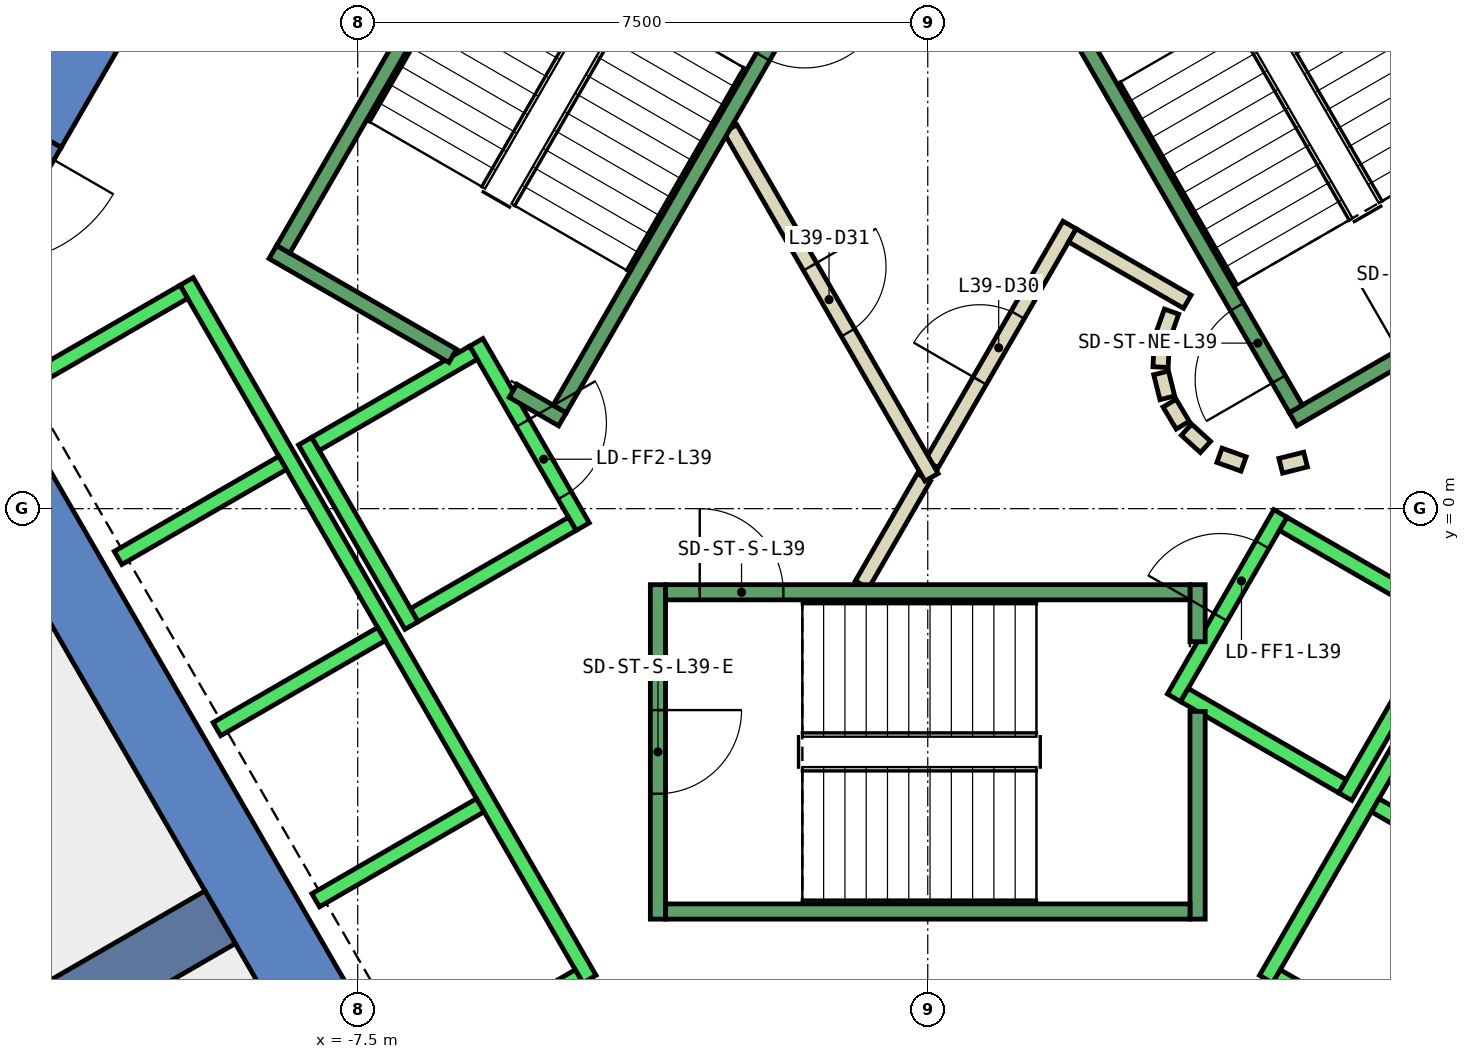
"""IFC4 building model, lengths in metres.
Left out: names, types, materials, properties, quantities, classifications, styles, units other than length and angle.
Written with IfcOpenShell. Run it as: python <this file> out.ifc"""

import sys

from ifc_helpers import new_model, si_unit, direction, frame, frame_2d, origin, place, context, subcontext, project, spatial, polyline, rectangle, outline, extrude, element, fill, save


model = new_model("IFC4")
c1 = context("Model", 3, precision=1e-05, world=origin(), true_north=direction((0.0, 1.0)))
c2 = subcontext(c1, "Body", "Model", "MODEL_VIEW")
j1 = project(units=[si_unit("LENGTHUNIT", "METRE"), si_unit("PLANEANGLEUNIT", "RADIAN")], contexts=[c1])
p1 = place(None, origin())
s1 = spatial("IfcSite", under=j1, at=p1, CompositionType="ELEMENT")
p2 = place(p1, origin())
s2 = spatial("IfcBuilding", under=s1, at=p2, CompositionType="ELEMENT")
p3 = place(p2, frame((0.0, 0.0, 176.0)))
s3 = spatial("IfcBuildingStorey", under=s2, at=p3, CompositionType="ELEMENT", Elevation=176.0)
p4 = place(p3, frame((0.0, 0.0, -0.4)))
e1 = element("IfcWall", 1, at=p4, inside=s3, PredefinedType="SHEAR", context=c2, shape_type="SweptSolid", body=[
    extrude(outline(polyline([(-12.267, 5.252), (-11.402, 4.752), (-6.351, 13.5), (-6.928, 14.5), (-12.267, 5.252)])), origin(), (0.0, 0.0, 1.0), 4.2),
])
p5 = place(p3, frame((0.0, 0.0, 3.6)))
e2 = element("IfcWall", 2, at=p5, inside=s3, PredefinedType="SHEAR", context=c2, shape_type="SweptSolid", body=[
    extrude(outline(polyline([(-13.267, 3.52), (-12.402, 3.02), (-11.402, 4.752), (-12.267, 5.252), (-13.267, 3.52)])), origin(), (0.0, 0.0, 1.0), 0.2),
])
p6 = place(p3, frame((0.0, 0.0, -0.4)))
e3 = element("IfcWall", 3, at=p6, inside=s3, PredefinedType="SHEAR", context=c2, shape_type="SweptSolid", body=[
    extrude(outline(polyline([(-13.856, 2.5), (-6.928, -9.5), (-6.351, -8.5), (-12.702, 2.5), (-13.856, 2.5)])), origin(), (0.0, 0.0, 1.0), 4.2),
])
p7 = place(p3, frame((-9.31, -5.375, -0.4), z_axis=(0.0, 0.0, 1.0), x_axis=(-0.866017533419, -0.500013631625, 0.0)))
e4 = element("IfcWall", 4, at=p7, inside=s3, PredefinedType="SHEAR", context=c2, shape_type="SweptSolid", body=[
    extrude(rectangle(XDim=9.0, YDim=0.8, at=frame_2d((4.5, 0.0))), origin(), (0.0, 0.0, 1.0), 4.2),
])
p8 = place(p3, frame((-0.866, -1.0, 0.0), z_axis=(0.0, 0.0, 1.0), x_axis=(0.500033287521, 0.866006184372, 0.0)))
e5 = element("IfcWall", 5, at=p8, inside=s3, PredefinedType="PARTITIONING", context=c2, shape_type="SweptSolid", body=[
    extrude(rectangle(XDim=1.632, YDim=0.2, at=frame_2d((0.816, 0.0))), origin(), (0.0, 0.0, 1.0), 3.75),
])
p9 = place(p3, frame((0.05, 0.587, 0.0), z_axis=(0.0, 0.0, 1.0), x_axis=(0.500028932171, 0.866008699143, 0.0)))
e6 = element("IfcWall", 6, at=p9, inside=s3, PredefinedType="PARTITIONING", context=c2, shape_type="SweptSolid", body=[
    extrude(rectangle(XDim=3.632, YDim=0.2, at=frame_2d((1.816, 0.0))), origin(), (0.0, 0.0, 1.0), 3.75),
])
p10 = place(p9, frame((1.266, 0.0, 0.0)))
e7 = element("IfcOpeningElement", 7, at=p10, cuts=e6, PredefinedType="OPENING", context=c2, shape_type="SweptSolid", body=[
    extrude(rectangle(XDim=1.0, YDim=2.1, at=frame_2d((0.5, 1.05))), frame((0.0, 0.11, 0.0), z_axis=(0.0, -1.0, 0.0), x_axis=(1.0, 0.0, 0.0)), (0.0, 0.0, 1.0), 0.22),
])
p11 = place(p3, frame((1.903, 3.595, 0.0), z_axis=(0.0, 0.0, 1.0), x_axis=(0.866239139897, -0.499629615326, 0.0)))
e8 = element("IfcWall", 8, at=p11, inside=s3, PredefinedType="PARTITIONING", context=c2, shape_type="SweptSolid", body=[
    extrude(rectangle(XDim=1.745, YDim=0.2, at=frame_2d((0.873, 0.0))), origin(), (0.0, 0.0, 1.0), 3.75),
])
p12 = place(p3, frame((3.208, 2.592, 0.0), z_axis=(0.0, 0.0, 1.0), x_axis=(-0.337388820924, -0.941365382578, 0.0)))
e9 = element("IfcWall", 9, at=p12, inside=s3, PredefinedType="PARTITIONING", context=c2, shape_type="SweptSolid", body=[
    extrude(rectangle(XDim=0.338, YDim=0.2, at=frame_2d((0.169, 0.0))), origin(), (0.0, 0.0, 1.0), 3.75),
])
p13 = place(p3, frame((3.079, 2.199, 0.0), z_axis=(0.0, 0.0, 1.0), x_axis=(-0.047771483479, -0.998858290933, 0.0)))
e10 = element("IfcWall", 10, at=p13, inside=s3, PredefinedType="PARTITIONING", context=c2, shape_type="SweptSolid", body=[
    extrude(rectangle(XDim=0.337, YDim=0.2, at=frame_2d((0.169, 0.0))), origin(), (0.0, 0.0, 1.0), 3.75),
])
p14 = place(p3, frame((3.07, 1.786, 0.0), z_axis=(0.0, 0.0, 1.0), x_axis=(0.242705583207, -0.970099994784, 0.0)))
e11 = element("IfcWall", 11, at=p14, inside=s3, PredefinedType="PARTITIONING", context=c2, shape_type="SweptSolid", body=[
    extrude(rectangle(XDim=0.338, YDim=0.2, at=frame_2d((0.169, 0.0))), origin(), (0.0, 0.0, 1.0), 3.75),
])
for number, where, z_axis, x_axis in (
    (12, (3.182, 1.388, 0.0), (0.0, 0.0, 1.0), (0.512, -0.859, 0.0)),
    (13, (3.404, 1.039, 0.0), (0.0, 0.0, 1.0), (0.74, -0.672, 0.0)),
):
    element("IfcWall", number, at=place(p3, frame(where, z_axis=z_axis, x_axis=x_axis)), inside=s3, PredefinedType="PARTITIONING", context=c2, shape_type="SweptSolid", body=[
        extrude(rectangle(XDim=0.338, YDim=0.2, at=frame_2d((0.169, 0.0))), origin(), (0.0, 0.0, 1.0), 3.75),
    ])
p15 = place(p3, frame((3.838, 0.702, 0.0), z_axis=(0.0, 0.0, 1.0), x_axis=(0.941035081519, -0.338308993895, 0.0)))
e14 = element("IfcWall", 14, at=p15, inside=s3, PredefinedType="PARTITIONING", context=c2, shape_type="SweptSolid", body=[
    extrude(rectangle(XDim=0.337, YDim=0.2, at=frame_2d((0.168, 0.0))), origin(), (0.0, 0.0, 1.0), 3.75),
])
p16 = place(p3, frame((4.644, 0.564, 0.0), z_axis=(0.0, 0.0, 1.0), x_axis=(0.969929076366, 0.243387729394, 0.0)))
e15 = element("IfcWall", 15, at=p16, inside=s3, PredefinedType="PARTITIONING", context=c2, shape_type="SweptSolid", body=[
    extrude(rectangle(XDim=0.337, YDim=0.2, at=frame_2d((0.168, 0.0))), origin(), (0.0, 0.0, 1.0), 3.75),
])
p17 = place(p3, frame((-2.598, 5.0, 0.0), z_axis=(0.0, 0.0, 1.0), x_axis=(0.49995654735, -0.86605048973, 0.0)))
e16 = element("IfcWall", 16, at=p17, inside=s3, PredefinedType="PARTITIONING", context=c2, shape_type="SweptSolid", body=[
    extrude(rectangle(XDim=5.296, YDim=0.2, at=frame_2d((2.648, 0.0))), origin(), (0.0, 0.0, 1.0), 3.75),
])
p18 = place(p17, frame((2.098, 0.0, 0.0)))
e17 = element("IfcOpeningElement", 17, at=p18, cuts=e16, PredefinedType="OPENING", context=c2, shape_type="SweptSolid", body=[
    extrude(rectangle(XDim=1.0, YDim=2.1, at=frame_2d((0.5, 1.05))), frame((0.0, 0.11, 0.0), z_axis=(0.0, -1.0, 0.0), x_axis=(1.0, 0.0, 0.0)), (0.0, 0.0, 1.0), 0.22),
])
p19 = place(p3, frame((-5.94, 2.188, 0.0), z_axis=(0.0, 0.0, 1.0), x_axis=(0.49994636267, -0.866056369097, 0.0)))
e18 = element("IfcWall", 18, at=p19, inside=s3, PredefinedType="STANDARD", context=c2, shape_type="SweptSolid", body=[
    extrude(rectangle(XDim=2.8, YDim=0.2, at=frame_2d((1.4, 0.0))), origin(), (0.0, 0.0, 1.0), 3.75),
])
p20 = place(p19, frame((1.225, 0.0, 0.0)))
e19 = element("IfcOpeningElement", 19, at=p20, cuts=e18, PredefinedType="OPENING", context=c2, shape_type="SweptSolid", body=[
    extrude(rectangle(XDim=1.1, YDim=2.1, at=frame_2d((0.55, 1.05))), frame((0.0, 0.11, 0.0), z_axis=(0.0, -1.0, 0.0), x_axis=(1.0, 0.0, 0.0)), (0.0, 0.0, 1.0), 0.22),
])
p21 = place(p3, frame((-8.192, 0.888, 0.0), z_axis=(0.0, 0.0, 1.0), x_axis=(0.49994636267, -0.866056369097, 0.0)))
e20 = element("IfcWall", 20, at=p21, inside=s3, PredefinedType="STANDARD", context=c2, shape_type="SweptSolid", body=[
    extrude(rectangle(XDim=2.8, YDim=0.2, at=frame_2d((1.4, 0.0))), origin(), (0.0, 0.0, 1.0), 3.75),
])
for number, where, z_axis, x_axis in (
    (21, (-5.977, 2.052, 0.0), (0.0, 0.0, 1.0), (-0.866, -0.5, 0.0)),
    (22, (-4.677, -0.2, 0.0), (0.0, 0.0, 1.0), (-0.866, -0.5, 0.0)),
):
    element("IfcWall", number, at=place(p3, frame(where, z_axis=z_axis, x_axis=x_axis)), inside=s3, PredefinedType="STANDARD", context=c2, shape_type="SweptSolid", body=[
        extrude(rectangle(XDim=2.399, YDim=0.2, at=frame_2d((1.2, 0.0))), origin(), (0.0, 0.0, 1.0), 3.75),
    ])
p22 = place(p3, frame((-9.751, 2.99, 0.0), z_axis=(0.0, 0.0, 1.0), x_axis=(0.50000090737, -0.866024879913, 0.0)))
e23 = element("IfcWall", 23, at=p22, inside=s3, PredefinedType="STANDARD", context=c2, shape_type="SweptSolid", body=[
    extrude(rectangle(XDim=10.6, YDim=0.2, at=frame_2d((5.3, 0.0))), origin(), (0.0, 0.0, 1.0), 3.75),
])
p23 = place(p3, frame((-9.788, 2.853, 0.0), z_axis=(0.0, 0.0, 1.0), x_axis=(-0.865998541277, -0.500046524342, 0.0)))
e24 = element("IfcWall", 24, at=p23, inside=s3, PredefinedType="STANDARD", context=c2, shape_type="SweptSolid", body=[
    extrude(rectangle(XDim=2.5, YDim=0.2, at=frame_2d((1.25, 0.0))), origin(), (0.0, 0.0, 1.0), 3.75),
])
for number, where, z_axis, x_axis in (
    (25, (-8.488, 0.602, 0.0), (0.0, 0.0, 1.0), (-0.866, -0.5, 0.0)),
    (26, (-7.188, -1.65, 0.0), (0.0, 0.0, 1.0), (-0.866, -0.5, 0.0)),
    (27, (-5.888, -3.902, 0.0), (0.0, 0.0, 1.0), (-0.866, -0.5, 0.0)),
    (28, (-4.588, -6.153, 0.0), (0.0, 0.0, 1.0), (-0.866, -0.5, 0.0)),
):
    element("IfcWall", number, at=place(p3, frame(where, z_axis=z_axis, x_axis=x_axis)), inside=s3, PredefinedType="STANDARD", context=c2, shape_type="SweptSolid", body=[
        extrude(rectangle(XDim=2.5, YDim=0.2, at=frame_2d((1.25, 0.0))), origin(), (0.0, 0.0, 1.0), 3.75),
    ])
p24 = place(p3, frame((3.24, -2.488, 0.0), z_axis=(0.0, 0.0, 1.0), x_axis=(0.49994636267, 0.866056369097, 0.0)))
e29 = element("IfcWall", 29, at=p24, inside=s3, PredefinedType="STANDARD", context=c2, shape_type="SweptSolid", body=[
    extrude(rectangle(XDim=2.8, YDim=0.2, at=frame_2d((1.4, 0.0))), origin(), (0.0, 0.0, 1.0), 3.75),
])
p25 = place(p24, frame((1.225, 0.0, 0.0)))
e30 = element("IfcOpeningElement", 30, at=p25, cuts=e29, PredefinedType="OPENING", context=c2, shape_type="SweptSolid", body=[
    extrude(rectangle(XDim=1.1, YDim=2.1, at=frame_2d((0.55, 1.05))), frame((0.0, 0.11, 0.0), z_axis=(0.0, -1.0, 0.0), x_axis=(1.0, 0.0, 0.0)), (0.0, 0.0, 1.0), 0.22),
])
p26 = place(p3, frame((5.492, -3.788, 0.0), z_axis=(0.0, 0.0, 1.0), x_axis=(0.500011755427, 0.866018616679, 0.0)))
e31 = element("IfcWall", 31, at=p26, inside=s3, PredefinedType="STANDARD", context=c2, shape_type="SweptSolid", body=[
    extrude(rectangle(XDim=2.8, YDim=0.2, at=frame_2d((1.4, 0.0))), origin(), (0.0, 0.0, 1.0), 3.75),
])
p27 = place(p3, frame((3.377, -2.452, 0.0), z_axis=(0.0, 0.0, 1.0), x_axis=(0.865955154139, -0.50012165622, 0.0)))
e32 = element("IfcWall", 32, at=p27, inside=s3, PredefinedType="STANDARD", context=c2, shape_type="SweptSolid", body=[
    extrude(rectangle(XDim=2.4, YDim=0.2, at=frame_2d((1.2, 0.0))), origin(), (0.0, 0.0, 1.0), 3.75),
])
p28 = place(p3, frame((4.677, -0.2, 0.0), z_axis=(0.0, 0.0, 1.0), x_axis=(0.865973769406, -0.500089422704, 0.0)))
e33 = element("IfcWall", 33, at=p28, inside=s3, PredefinedType="STANDARD", context=c2, shape_type="SweptSolid", body=[
    extrude(rectangle(XDim=2.399, YDim=0.2, at=frame_2d((1.2, 0.0))), origin(), (0.0, 0.0, 1.0), 3.75),
])
p29 = place(p3, frame((4.451, -6.19, 0.0), z_axis=(0.0, 0.0, 1.0), x_axis=(0.50000090737, 0.866024879913, 0.0)))
e34 = element("IfcWall", 34, at=p29, inside=s3, PredefinedType="STANDARD", context=c2, shape_type="SweptSolid", body=[
    extrude(rectangle(XDim=10.6, YDim=0.2, at=frame_2d((5.3, 0.0))), origin(), (0.0, 0.0, 1.0), 3.75),
])
for number, where, z_axis, x_axis in (
    (35, (4.588, -6.153, 0.0), (0.0, 0.0, 1.0), (0.866, -0.5, 0.0)),
    (36, (5.888, -3.902, 0.0), (0.0, 0.0, 1.0), (0.866, -0.5, 0.0)),
):
    element("IfcWall", number, at=place(p3, frame(where, z_axis=z_axis, x_axis=x_axis)), inside=s3, PredefinedType="STANDARD", context=c2, shape_type="SweptSolid", body=[
        extrude(rectangle(XDim=2.5, YDim=0.2, at=frame_2d((1.25, 0.0))), origin(), (0.0, 0.0, 1.0), 3.75),
    ])
p30 = place(p3, frame((-3.55, -1.0, 0.0), z_axis=(0.0, 0.0, 1.0), x_axis=(0.0, -1.0, 0.0)))
e37 = element("IfcWall", 37, at=p30, inside=s3, PredefinedType="STANDARD", context=c2, shape_type="SweptSolid", body=[
    extrude(rectangle(XDim=4.4, YDim=0.2, at=frame_2d((2.2, 0.0))), origin(), (0.0, 0.0, 1.0), 3.75),
])
p31 = place(p30, frame((1.65, 0.0, 0.0)))
e38 = element("IfcOpeningElement", 38, at=p31, cuts=e37, PredefinedType="OPENING", context=c2, shape_type="SweptSolid", body=[
    extrude(rectangle(XDim=1.1, YDim=2.2, at=frame_2d((0.55, 1.1))), frame((0.0, 0.11, 0.0), z_axis=(0.0, -1.0, 0.0), x_axis=(1.0, 0.0, 0.0)), (0.0, 0.0, 1.0), 0.22),
])
p32 = place(p3, frame((3.55, -2.667, 0.0), z_axis=(0.0, 0.0, 1.0), x_axis=(0.0, -1.0, 0.0)))
e39 = element("IfcWall", 39, at=p32, inside=s3, PredefinedType="STANDARD", context=c2, shape_type="SweptSolid", body=[
    extrude(rectangle(XDim=2.733, YDim=0.2, at=frame_2d((1.366, 0.0))), origin(), (0.0, 0.0, 1.0), 3.75),
])
p33 = place(p3, frame((3.55, -1.0, 0.0), z_axis=(0.0, 0.0, 1.0), x_axis=(0.0, -1.0, 0.0)))
e40 = element("IfcWall", 40, at=p33, inside=s3, PredefinedType="STANDARD", context=c2, shape_type="SweptSolid", body=[
    extrude(rectangle(XDim=0.751, YDim=0.2, at=frame_2d((0.375, 0.0))), origin(), (0.0, 0.0, 1.0), 3.75),
])
p34 = place(p3, frame((-3.45, -1.1, 0.0), z_axis=(0.0, 0.0, 1.0), x_axis=(1.0, 0.0, 0.0)))
e41 = element("IfcWall", 41, at=p34, inside=s3, PredefinedType="STANDARD", context=c2, shape_type="SweptSolid", body=[
    extrude(rectangle(XDim=6.9, YDim=0.2, at=frame_2d((3.45, 0.0))), origin(), (0.0, 0.0, 1.0), 3.75),
])
p35 = place(p34, frame((0.45, 0.0, 0.0)))
e42 = element("IfcOpeningElement", 42, at=p35, cuts=e41, PredefinedType="OPENING", context=c2, shape_type="SweptSolid", body=[
    extrude(rectangle(XDim=1.1, YDim=2.2, at=frame_2d((0.55, 1.1))), frame((0.0, 0.11, 0.0), z_axis=(0.0, -1.0, 0.0), x_axis=(1.0, 0.0, 0.0)), (0.0, 0.0, 1.0), 0.22),
])
p36 = place(p3, frame((-3.45, -5.3, 0.0), z_axis=(0.0, 0.0, 1.0), x_axis=(1.0, 0.0, 0.0)))
e43 = element("IfcWall", 43, at=p36, inside=s3, PredefinedType="STANDARD", context=c2, shape_type="SweptSolid", body=[
    extrude(rectangle(XDim=6.9, YDim=0.2, at=frame_2d((3.45, 0.0))), origin(), (0.0, 0.0, 1.0), 3.75),
])
p37 = place(p3, frame((4.806, 1.176, 0.0), z_axis=(0.0, 0.0, 1.0), x_axis=(0.866059941101, 0.499940174841, 0.0)))
e44 = element("IfcWall", 44, at=p37, inside=s3, PredefinedType="STANDARD", context=c2, shape_type="SweptSolid", body=[
    extrude(rectangle(XDim=4.4, YDim=0.2, at=frame_2d((2.2, 0.0))), origin(), (0.0, 0.0, 1.0), 3.75),
])
p38 = place(p37, frame((1.65, 0.0, 0.0)))
e45 = element("IfcOpeningElement", 45, at=p38, cuts=e44, PredefinedType="OPENING", context=c2, shape_type="SweptSolid", body=[
    extrude(rectangle(XDim=1.1, YDim=2.2, at=frame_2d((0.55, 1.1))), frame((0.0, 0.11, 0.0), z_axis=(0.0, -1.0, 0.0), x_axis=(1.0, 0.0, 0.0)), (0.0, 0.0, 1.0), 0.22),
])
p39 = place(p3, frame((4.843, 1.312, 0.0), z_axis=(0.0, 0.0, 1.0), x_axis=(-0.499963383562, 0.866046543262, 0.0)))
e46 = element("IfcWall", 46, at=p39, inside=s3, PredefinedType="STANDARD", context=c2, shape_type="SweptSolid", body=[
    extrude(rectangle(XDim=6.9, YDim=0.2, at=frame_2d((3.45, 0.0))), origin(), (0.0, 0.0, 1.0), 3.75),
])
p40 = place(p39, frame((0.45, 0.0, 0.0)))
e47 = element("IfcOpeningElement", 47, at=p40, cuts=e46, PredefinedType="OPENING", context=c2, shape_type="SweptSolid", body=[
    extrude(rectangle(XDim=1.1, YDim=2.2, at=frame_2d((0.55, 1.1))), frame((0.0, 0.11, 0.0), z_axis=(0.0, -1.0, 0.0), x_axis=(1.0, 0.0, 0.0)), (0.0, 0.0, 1.0), 0.22),
])
p41 = place(p3, frame((8.48, 3.412, 0.0), z_axis=(0.0, 0.0, 1.0), x_axis=(-0.499978703459, 0.866037698999, 0.0)))
e48 = element("IfcWall", 48, at=p41, inside=s3, PredefinedType="STANDARD", context=c2, shape_type="SweptSolid", body=[
    extrude(rectangle(XDim=6.9, YDim=0.2, at=frame_2d((3.45, 0.0))), origin(), (0.0, 0.0, 1.0), 3.75),
])
p42 = place(p3, frame((-6.25, 2.01, 0.0), z_axis=(0.0, 0.0, 1.0), x_axis=(-0.86611865017, 0.499838457731, 0.0)))
e49 = element("IfcWall", 49, at=p42, inside=s3, PredefinedType="STANDARD", context=c2, shape_type="SweptSolid", body=[
    extrude(rectangle(XDim=2.733, YDim=0.2, at=frame_2d((1.366, 0.0))), origin(), (0.0, 0.0, 1.0), 3.75),
])
p43 = place(p3, frame((-4.806, 1.176, 0.0), z_axis=(0.0, 0.0, 1.0), x_axis=(-0.866558586415, 0.499075361355, 0.0)))
e50 = element("IfcWall", 50, at=p43, inside=s3, PredefinedType="STANDARD", context=c2, shape_type="SweptSolid", body=[
    extrude(rectangle(XDim=0.751, YDim=0.2, at=frame_2d((0.376, 0.0))), origin(), (0.0, 0.0, 1.0), 3.75),
])
p44 = place(p3, frame((-1.393, 7.288, 0.0), z_axis=(0.0, 0.0, 1.0), x_axis=(-0.499963383562, -0.866046543262, 0.0)))
e51 = element("IfcWall", 51, at=p44, inside=s3, PredefinedType="STANDARD", context=c2, shape_type="SweptSolid", body=[
    extrude(rectangle(XDim=6.9, YDim=0.2, at=frame_2d((3.45, 0.0))), origin(), (0.0, 0.0, 1.0), 3.75),
])
p45 = place(p44, frame((0.45, 0.0, 0.0)))
e52 = element("IfcOpeningElement", 52, at=p45, cuts=e51, PredefinedType="OPENING", context=c2, shape_type="SweptSolid", body=[
    extrude(rectangle(XDim=1.1, YDim=2.2, at=frame_2d((0.55, 1.1))), frame((0.0, 0.11, 0.0), z_axis=(0.0, -1.0, 0.0), x_axis=(1.0, 0.0, 0.0)), (0.0, 0.0, 1.0), 0.22),
])
p46 = place(p3, frame((-5.03, 9.388, 0.0), z_axis=(0.0, 0.0, 1.0), x_axis=(-0.499978703459, -0.866037698999, 0.0)))
e53 = element("IfcWall", 53, at=p46, inside=s3, PredefinedType="STANDARD", context=c2, shape_type="SweptSolid", body=[
    extrude(rectangle(XDim=6.9, YDim=0.2, at=frame_2d((3.45, 0.0))), origin(), (0.0, 0.0, 1.0), 3.75),
])
p47 = place(p10, origin())
e54 = element("IfcDoor", 54, at=p47, inside=s3, OperationType="SINGLE_SWING_RIGHT", PredefinedType="DOOR", context=c2, shape_type="SweptSolid", body=[
    extrude(rectangle(XDim=1.0, YDim=2.1, at=frame_2d((0.5, 1.05))), frame((0.0, 0.025, 0.0), z_axis=(0.0, -1.0, 0.0), x_axis=(1.0, 0.0, 0.0)), (0.0, 0.0, 1.0), 0.05),
])
fill(e7, e54)
p48 = place(p18, origin())
e55 = element("IfcDoor", 55, at=p48, inside=s3, OperationType="SINGLE_SWING_RIGHT", PredefinedType="DOOR", context=c2, shape_type="SweptSolid", body=[
    extrude(rectangle(XDim=1.0, YDim=2.1, at=frame_2d((0.5, 1.05))), frame((0.0, 0.025, 0.0), z_axis=(0.0, -1.0, 0.0), x_axis=(1.0, 0.0, 0.0)), (0.0, 0.0, 1.0), 0.05),
])
fill(e17, e55)
p49 = place(p25, origin())
e56 = element("IfcDoor", 56, at=p49, inside=s3, OperationType="SLIDING_TO_LEFT", PredefinedType="DOOR", context=c2, shape_type="SweptSolid", body=[
    extrude(rectangle(XDim=1.1, YDim=2.1, at=frame_2d((0.55, 1.05))), frame((0.0, 0.025, 0.0), z_axis=(0.0, -1.0, 0.0), x_axis=(1.0, 0.0, 0.0)), (0.0, 0.0, 1.0), 0.05),
])
fill(e30, e56)
p50 = place(p20, origin())
e57 = element("IfcDoor", 57, at=p50, inside=s3, OperationType="SLIDING_TO_LEFT", PredefinedType="DOOR", context=c2, shape_type="SweptSolid", body=[
    extrude(rectangle(XDim=1.1, YDim=2.1, at=frame_2d((0.55, 1.05))), frame((0.0, 0.025, 0.0), z_axis=(0.0, -1.0, 0.0), x_axis=(1.0, 0.0, 0.0)), (0.0, 0.0, 1.0), 0.05),
])
fill(e19, e57)
p51 = place(p35, origin())
e58 = element("IfcDoor", 58, at=p51, inside=s3, OperationType="SINGLE_SWING_LEFT", PredefinedType="DOOR", context=c2, shape_type="SweptSolid", body=[
    extrude(rectangle(XDim=1.1, YDim=2.2, at=frame_2d((0.55, 1.1))), frame((0.0, 0.025, 0.0), z_axis=(0.0, -1.0, 0.0), x_axis=(1.0, 0.0, 0.0)), (0.0, 0.0, 1.0), 0.05),
])
fill(e42, e58)
p52 = place(p31, origin())
e59 = element("IfcDoor", 59, at=p52, inside=s3, OperationType="SINGLE_SWING_LEFT", PredefinedType="DOOR", context=c2, shape_type="SweptSolid", body=[
    extrude(rectangle(XDim=1.1, YDim=2.2, at=frame_2d((0.55, 1.1))), frame((0.0, 0.025, 0.0), z_axis=(0.0, -1.0, 0.0), x_axis=(1.0, 0.0, 0.0)), (0.0, 0.0, 1.0), 0.05),
])
fill(e38, e59)
p53 = place(p40, origin())
e60 = element("IfcDoor", 60, at=p53, inside=s3, OperationType="SINGLE_SWING_LEFT", PredefinedType="DOOR", context=c2, shape_type="SweptSolid", body=[
    extrude(rectangle(XDim=1.1, YDim=2.2, at=frame_2d((0.55, 1.1))), frame((0.0, 0.025, 0.0), z_axis=(0.0, -1.0, 0.0), x_axis=(1.0, 0.0, 0.0)), (0.0, 0.0, 1.0), 0.05),
])
fill(e47, e60)
p54 = place(p45, origin())
e61 = element("IfcDoor", 61, at=p54, inside=s3, OperationType="SINGLE_SWING_LEFT", PredefinedType="DOOR", context=c2, shape_type="SweptSolid", body=[
    extrude(rectangle(XDim=1.1, YDim=2.2, at=frame_2d((0.55, 1.1))), frame((0.0, 0.025, 0.0), z_axis=(0.0, -1.0, 0.0), x_axis=(1.0, 0.0, 0.0)), (0.0, 0.0, 1.0), 0.05),
])
fill(e52, e61)
save(model, sys.argv[1])
